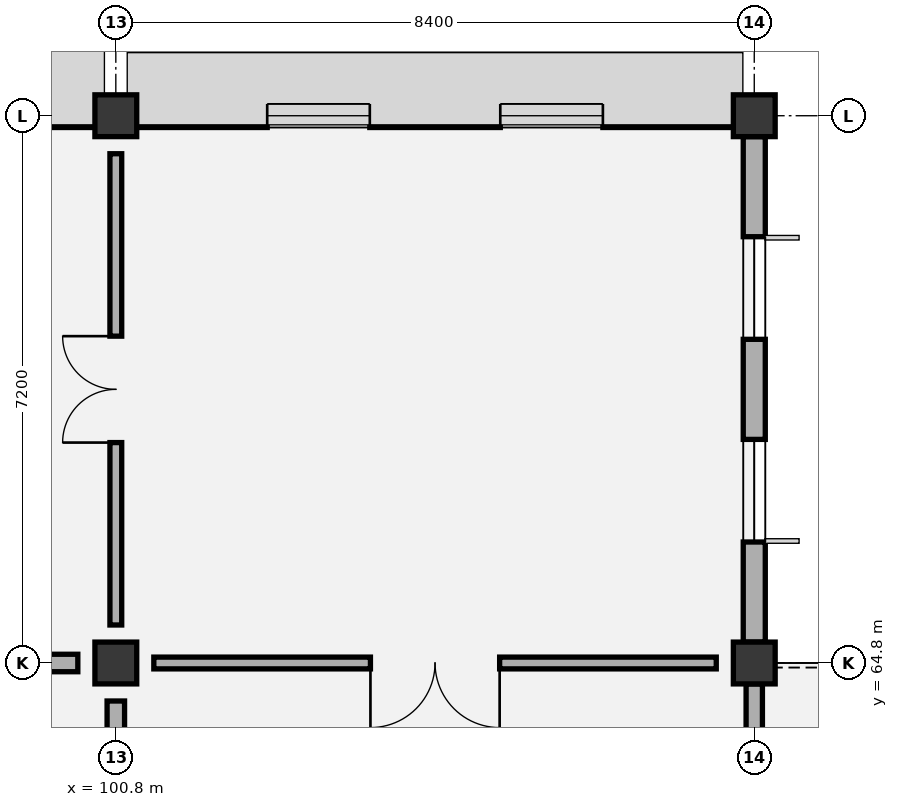
"""IFC4 building model, lengths in metres.
Left out: names, types, materials, properties, quantities, classifications, styles, units other than length and angle.
Written with IfcOpenShell. Run it as: python <this file> out.ifc"""

import sys

from ifc_helpers import new_model, si_unit, direction, frame, frame_2d, origin, origin_2d, place, context, subcontext, project, spatial, rectangle, extrude, element, fill, save


model = new_model("IFC4")
c1 = context("Model", 3, precision=1e-05, world=origin(), true_north=direction((0.0, 1.0)))
c2 = subcontext(c1, "Body", "Model", "MODEL_VIEW")
j1 = project(units=[si_unit("LENGTHUNIT", "METRE"), si_unit("PLANEANGLEUNIT", "RADIAN")], contexts=[c1])
p1 = place(None, origin())
s1 = spatial("IfcSite", under=j1, at=p1, CompositionType="ELEMENT")
p2 = place(p1, origin())
s2 = spatial("IfcBuilding", under=s1, at=p2, CompositionType="ELEMENT")
p3 = place(p2, frame((0.0, 0.0, 60.6)))
s3 = spatial("IfcBuildingStorey", under=s2, at=p3, CompositionType="ELEMENT", Elevation=60.6)
for number, where, z_axis, x_axis in (
    (1, (100.8, 64.8, 0.0), (0.0, 0.0, 1.0), (1.0, 0.0, 0.0)),
    (2, (100.8, 72.0, 0.0), (0.0, 0.0, 1.0), (1.0, 0.0, 0.0)),
    (3, (109.2, 64.8, 0.0), (0.0, 0.0, 1.0), (1.0, 0.0, 0.0)),
    (4, (109.2, 72.0, 0.0), (0.0, 0.0, 1.0), (1.0, 0.0, 0.0)),
):
    element("IfcColumn", number, at=place(p3, frame(where, z_axis=z_axis, x_axis=x_axis)), inside=s3, PredefinedType="COLUMN", context=c2, shape_type="SweptSolid", body=[
        extrude(rectangle(XDim=0.55, YDim=0.55, at=origin_2d()), origin(), (0.0, 0.0, 1.0), 4.2),
    ])
p4 = place(p3, frame((92.675, 72.0, 0.0), z_axis=(0.0, 0.0, 1.0), x_axis=(1.0, 0.0, 0.0)))
e5 = element("IfcWall", 5, at=p4, inside=s3, PredefinedType="SOLIDWALL", context=c2, shape_type="SweptSolid", body=[
    extrude(rectangle(XDim=7.85, YDim=0.31, at=frame_2d((3.925, 0.0))), origin(), (0.0, 0.0, 1.0), 3.445),
])
p5 = place(p4, frame((1.617, 0.0, 0.95)))
e6 = element("IfcOpeningElement", 6, at=p5, cuts=e5, PredefinedType="OPENING", context=c2, shape_type="SweptSolid", body=[
    extrude(rectangle(XDim=1.5, YDim=1.5, at=frame_2d((0.75, 0.75))), frame((0.0, 0.165, 0.0), z_axis=(0.0, -1.0, 0.0), x_axis=(1.0, 0.0, 0.0)), (0.0, 0.0, 1.0), 0.33),
])
p6 = place(p4, frame((4.733, 0.0, 0.95)))
e7 = element("IfcOpeningElement", 7, at=p6, cuts=e5, PredefinedType="OPENING", context=c2, shape_type="SweptSolid", body=[
    extrude(rectangle(XDim=1.5, YDim=1.5, at=frame_2d((0.75, 0.75))), frame((0.0, 0.165, 0.0), z_axis=(0.0, -1.0, 0.0), x_axis=(1.0, 0.0, 0.0)), (0.0, 0.0, 1.0), 0.33),
])
p7 = place(p3, frame((109.2, 57.875, 0.0), z_axis=(0.0, 0.0, 1.0), x_axis=(0.0, 1.0, 0.0)))
e8 = element("IfcWall", 8, at=p7, inside=s3, PredefinedType="SOLIDWALL", context=c2, shape_type="SweptSolid", body=[
    extrude(rectangle(XDim=6.65, YDim=0.215, at=frame_2d((3.325, 0.0))), origin(), (0.0, 0.0, 1.0), 3.395),
])
p8 = place(p7, frame((2.7, 0.0, 0.0)))
e9 = element("IfcOpeningElement", 9, at=p8, cuts=e8, PredefinedType="OPENING", context=c2, shape_type="SweptSolid", body=[
    extrude(rectangle(XDim=1.25, YDim=2.15, at=frame_2d((0.625, 1.075))), frame((0.0, 0.117, 0.0), z_axis=(0.0, -1.0, 0.0), x_axis=(1.0, 0.0, 0.0)), (0.0, 0.0, 1.0), 0.235),
])
p9 = place(p3, frame((101.075, 72.0, 0.0), z_axis=(0.0, 0.0, 1.0), x_axis=(1.0, 0.0, 0.0)))
e10 = element("IfcWall", 10, at=p9, inside=s3, PredefinedType="SOLIDWALL", context=c2, shape_type="SweptSolid", body=[
    extrude(rectangle(XDim=7.85, YDim=0.31, at=frame_2d((3.925, 0.0))), origin(), (0.0, 0.0, 1.0), 3.445),
])
p10 = place(p9, frame((1.717, 0.0, 0.95)))
e11 = element("IfcOpeningElement", 11, at=p10, cuts=e10, PredefinedType="OPENING", context=c2, shape_type="SweptSolid", body=[
    extrude(rectangle(XDim=1.35, YDim=1.65, at=frame_2d((0.675, 0.825))), frame((0.0, 0.165, 0.0), z_axis=(0.0, -1.0, 0.0), x_axis=(1.0, 0.0, 0.0)), (0.0, 0.0, 1.0), 0.33),
])
p11 = place(p9, frame((4.783, 0.0, 0.95)))
e12 = element("IfcOpeningElement", 12, at=p11, cuts=e10, PredefinedType="OPENING", context=c2, shape_type="SweptSolid", body=[
    extrude(rectangle(XDim=1.35, YDim=1.65, at=frame_2d((0.675, 0.825))), frame((0.0, 0.165, 0.0), z_axis=(0.0, -1.0, 0.0), x_axis=(1.0, 0.0, 0.0)), (0.0, 0.0, 1.0), 0.33),
])
p12 = place(p3, frame((109.2, 65.075, 0.0), z_axis=(0.0, 0.0, 1.0), x_axis=(0.0, 1.0, 0.0)))
e13 = element("IfcWall", 13, at=p12, inside=s3, PredefinedType="SOLIDWALL", context=c2, shape_type="SweptSolid", body=[
    extrude(rectangle(XDim=6.65, YDim=0.29, at=frame_2d((3.325, 0.0))), origin(), (0.0, 0.0, 1.0), 3.445),
])
p13 = place(p12, frame((1.317, 0.0, 0.95)))
e14 = element("IfcOpeningElement", 14, at=p13, cuts=e13, PredefinedType="OPENING", context=c2, shape_type="SweptSolid", body=[
    extrude(rectangle(XDim=1.35, YDim=1.65, at=frame_2d((0.675, 0.825))), frame((0.0, 0.155, 0.0), z_axis=(0.0, -1.0, 0.0), x_axis=(1.0, 0.0, 0.0)), (0.0, 0.0, 1.0), 0.31),
])
p14 = place(p12, frame((3.983, 0.0, 0.95)))
e15 = element("IfcOpeningElement", 15, at=p14, cuts=e13, PredefinedType="OPENING", context=c2, shape_type="SweptSolid", body=[
    extrude(rectangle(XDim=1.35, YDim=1.65, at=frame_2d((0.675, 0.825))), frame((0.0, 0.155, 0.0), z_axis=(0.0, -1.0, 0.0), x_axis=(1.0, 0.0, 0.0)), (0.0, 0.0, 1.0), 0.31),
])
p15 = place(p3, frame((100.8, 58.1, 0.0), z_axis=(0.0, 0.0, 1.0), x_axis=(0.0, 1.0, 0.0)))
e16 = element("IfcWall", 16, at=p15, inside=s3, PredefinedType="PARTITIONING", context=c2, shape_type="SweptSolid", body=[
    extrude(rectangle(XDim=6.2, YDim=0.23, at=frame_2d((3.1, 0.0))), origin(), (0.0, 0.0, 1.0), 3.445),
])
p16 = place(p3, frame((92.9, 64.8, 0.0), z_axis=(0.0, 0.0, 1.0), x_axis=(1.0, 0.0, 0.0)))
e17 = element("IfcWall", 17, at=p16, inside=s3, PredefinedType="PARTITIONING", context=c2, shape_type="SweptSolid", body=[
    extrude(rectangle(XDim=7.4, YDim=0.23, at=frame_2d((3.7, 0.0))), origin(), (0.0, 0.0, 1.0), 3.655),
])
p17 = place(p3, frame((100.8, 65.3, 0.0), z_axis=(0.0, 0.0, 1.0), x_axis=(0.0, 1.0, 0.0)))
e18 = element("IfcWall", 18, at=p17, inside=s3, PredefinedType="PARTITIONING", context=c2, shape_type="SweptSolid", body=[
    extrude(rectangle(XDim=6.2, YDim=0.155, at=frame_2d((3.1, 0.0))), origin(), (0.0, 0.0, 1.0), 3.495),
])
p18 = place(p17, frame((2.4, 0.0, 0.0)))
e19 = element("IfcOpeningElement", 19, at=p18, cuts=e18, PredefinedType="OPENING", context=c2, shape_type="SweptSolid", body=[
    extrude(rectangle(XDim=1.4, YDim=2.15, at=frame_2d((0.7, 1.075))), frame((0.0, 0.087, 0.0), z_axis=(0.0, -1.0, 0.0), x_axis=(1.0, 0.0, 0.0)), (0.0, 0.0, 1.0), 0.175),
])
p19 = place(p3, frame((101.3, 64.8, 0.0), z_axis=(0.0, 0.0, 1.0), x_axis=(1.0, 0.0, 0.0)))
e20 = element("IfcWall", 20, at=p19, inside=s3, PredefinedType="PARTITIONING", context=c2, shape_type="SweptSolid", body=[
    extrude(rectangle(XDim=7.4, YDim=0.155, at=frame_2d((3.7, 0.0))), origin(), (0.0, 0.0, 1.0), 3.675),
])
p20 = place(p19, frame((2.85, 0.0, 0.0)))
e21 = element("IfcOpeningElement", 21, at=p20, cuts=e20, PredefinedType="OPENING", context=c2, shape_type="SweptSolid", body=[
    extrude(rectangle(XDim=1.7, YDim=2.25, at=frame_2d((0.85, 1.125))), frame((0.0, 0.087, 0.0), z_axis=(0.0, -1.0, 0.0), x_axis=(1.0, 0.0, 0.0)), (0.0, 0.0, 1.0), 0.175),
])
p21 = place(p10, origin())
e22 = element("IfcWindow", 22, at=p21, inside=s3, PartitioningType="SINGLE_PANEL", PredefinedType="WINDOW", context=c2, shape_type="SweptSolid", body=[
    extrude(rectangle(XDim=1.35, YDim=1.65, at=frame_2d((0.675, 0.825))), frame((0.0, 0.03, 0.0), z_axis=(0.0, -1.0, 0.0), x_axis=(1.0, 0.0, 0.0)), (0.0, 0.0, 1.0), 0.06),
])
fill(e11, e22)
p22 = place(p11, origin())
e23 = element("IfcWindow", 23, at=p22, inside=s3, PartitioningType="SINGLE_PANEL", PredefinedType="WINDOW", context=c2, shape_type="SweptSolid", body=[
    extrude(rectangle(XDim=1.35, YDim=1.65, at=frame_2d((0.675, 0.825))), frame((0.0, 0.03, 0.0), z_axis=(0.0, -1.0, 0.0), x_axis=(1.0, 0.0, 0.0)), (0.0, 0.0, 1.0), 0.06),
])
fill(e12, e23)
p23 = place(p13, origin())
e24 = element("IfcWindow", 24, at=p23, inside=s3, PartitioningType="SINGLE_PANEL", PredefinedType="WINDOW", context=c2, shape_type="SweptSolid", body=[
    extrude(rectangle(XDim=1.35, YDim=1.65, at=frame_2d((0.675, 0.825))), frame((0.0, 0.03, 0.0), z_axis=(0.0, -1.0, 0.0), x_axis=(1.0, 0.0, 0.0)), (0.0, 0.0, 1.0), 0.06),
])
fill(e14, e24)
p24 = place(p14, origin())
e25 = element("IfcWindow", 25, at=p24, inside=s3, PartitioningType="SINGLE_PANEL", PredefinedType="WINDOW", context=c2, shape_type="SweptSolid", body=[
    extrude(rectangle(XDim=1.35, YDim=1.65, at=frame_2d((0.675, 0.825))), frame((0.0, 0.03, 0.0), z_axis=(0.0, -1.0, 0.0), x_axis=(1.0, 0.0, 0.0)), (0.0, 0.0, 1.0), 0.06),
])
fill(e15, e25)
p25 = place(p18, origin())
e26 = element("IfcDoor", 26, at=p25, inside=s3, OperationType="DOUBLE_DOOR_SINGLE_SWING", PredefinedType="DOOR", context=c2, shape_type="SweptSolid", body=[
    extrude(rectangle(XDim=1.4, YDim=2.15, at=frame_2d((0.7, 1.075))), frame((0.0, 0.025, 0.0), z_axis=(0.0, -1.0, 0.0), x_axis=(1.0, 0.0, 0.0)), (0.0, 0.0, 1.0), 0.05),
])
fill(e19, e26)
p26 = place(p20, frame((1.7, 0.0, 0.0), z_axis=(0.0, 0.0, 1.0), x_axis=(-1.0, 0.0, 0.0)))
e27 = element("IfcDoor", 27, at=p26, inside=s3, OperationType="DOUBLE_DOOR_SINGLE_SWING", PredefinedType="DOOR", context=c2, shape_type="SweptSolid", body=[
    extrude(rectangle(XDim=1.7, YDim=2.25, at=frame_2d((0.85, 1.125))), frame((0.0, 0.025, 0.0), z_axis=(0.0, -1.0, 0.0), x_axis=(1.0, 0.0, 0.0)), (0.0, 0.0, 1.0), 0.05),
])
fill(e21, e27)
save(model, sys.argv[1])
